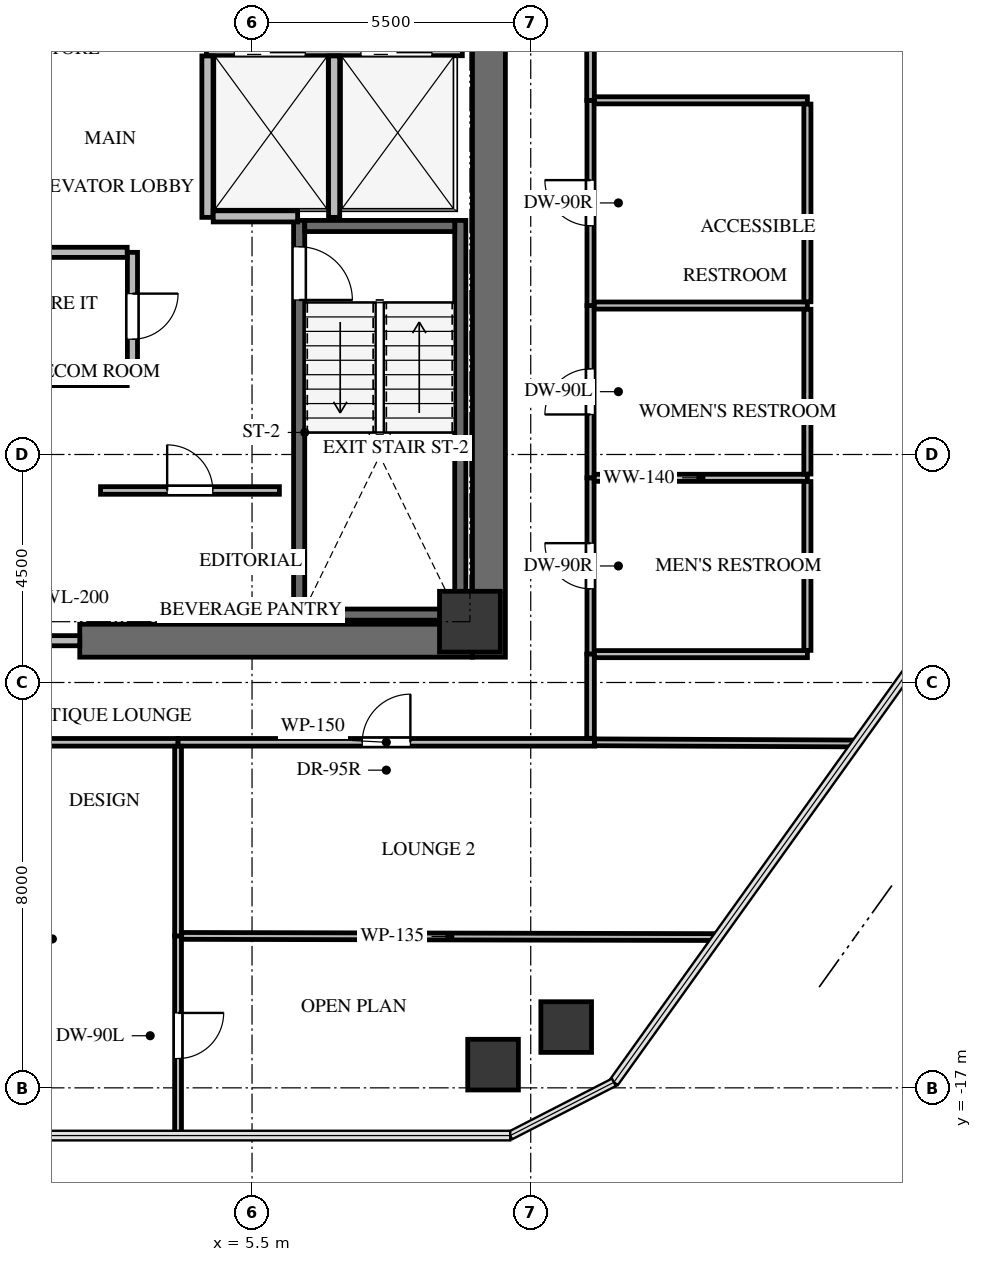
"""IFC4 building model, lengths in metres.
Left out: names, types, materials, properties, quantities, classifications, styles, units other than length and angle.
Written with IfcOpenShell. Run it as: python <this file> out.ifc"""

import sys

from ifc_helpers import new_model, si_unit, direction, frame, frame_2d, origin, origin_2d, place, context, subcontext, project, spatial, rectangle, extrude, source, transform, mapped, element, fill, save


model = new_model("IFC4")
c1 = context("Model", 3, precision=1e-05, world=origin(), true_north=direction((0.0, 1.0)))
c2 = subcontext(c1, "Body", "Model", "MODEL_VIEW")
j1 = project(units=[si_unit("LENGTHUNIT", "METRE"), si_unit("PLANEANGLEUNIT", "RADIAN")], contexts=[c1])
p1 = place(None, origin())
s1 = spatial("IfcSite", under=j1, at=p1, CompositionType="ELEMENT")
p2 = place(p1, origin())
s2 = spatial("IfcBuilding", under=s1, at=p2, CompositionType="ELEMENT")
p3 = place(p2, frame((0.0, 0.0, 187.0)))
s3 = spatial("IfcBuildingStorey", under=s2, at=p3, CompositionType="ELEMENT", Elevation=187.0)
p4 = place(p3, frame((10.175, -8.5, 0.0), z_axis=(0.0, 0.0, 1.0), x_axis=(0.0, 1.0, 0.0)))
e1 = element("IfcWall", 1, at=p4, inside=s3, PredefinedType="SHEAR", context=c2, shape_type="SweptSolid", body=[
    extrude(rectangle(XDim=17.0, YDim=0.65, at=frame_2d((8.5, 0.0))), origin(), (0.0, 0.0, 1.0), 3.3),
])
p5 = place(p3, frame((2.1, -8.175, 0.0), z_axis=(0.0, 0.0, 1.0), x_axis=(1.0, 0.0, 0.0)))
e2 = element("IfcWall", 2, at=p5, inside=s3, PredefinedType="SHEAR", context=c2, shape_type="SweptSolid", body=[
    extrude(rectangle(XDim=7.75, YDim=0.65, at=frame_2d((3.875, 0.0))), origin(), (0.0, 0.0, 1.0), 3.3),
])
p6 = place(p3, frame((9.61, -7.77, -0.24), z_axis=(0.0, 0.0, 1.0), x_axis=(0.0, 1.0, 0.0)))
e3 = element("IfcWall", 3, at=p6, inside=s3, PredefinedType="SHEAR", context=c2, shape_type="SweptSolid", body=[
    extrude(rectangle(XDim=7.89, YDim=0.22, at=frame_2d((3.945, 0.0))), origin(), (0.0, 0.0, 1.0), 3.3),
])
p7 = place(p3, frame((6.43, 0.12, -0.24), z_axis=(0.0, 0.0, 1.0), x_axis=(0.0, -1.0, 0.0)))
e4 = element("IfcWall", 4, at=p7, inside=s3, PredefinedType="SHEAR", context=c2, shape_type="SweptSolid", body=[
    extrude(rectangle(XDim=7.89, YDim=0.22, at=frame_2d((3.945, 0.0))), origin(), (0.0, 0.0, 1.0), 3.3),
])
p8 = place(p7, frame((0.52, 0.0, 0.0)))
e5 = element("IfcOpeningElement", 5, at=p8, cuts=e4, PredefinedType="OPENING", context=c2, shape_type="SweptSolid", body=[
    extrude(rectangle(XDim=1.05, YDim=2.15, at=frame_2d((0.525, 1.075))), frame((0.0, 0.12, 0.0), z_axis=(0.0, -1.0, 0.0), x_axis=(1.0, 0.0, 0.0)), (0.0, 0.0, 1.0), 0.24),
])
for number, where, z_axis, x_axis in (
    (6, (6.54, -7.66, -0.24), (0.0, 0.0, 1.0), (1.0, 0.0, 0.0)),
    (7, (9.5, 0.01, -0.24), (0.0, 0.0, 1.0), (-1.0, 0.0, 0.0)),
):
    element("IfcWall", number, at=place(p3, frame(where, z_axis=z_axis, x_axis=x_axis)), inside=s3, PredefinedType="SHEAR", context=c2, shape_type="SweptSolid", body=[
        extrude(rectangle(XDim=2.96, YDim=0.22, at=frame_2d((1.48, 0.0))), origin(), (0.0, 0.0, 1.0), 3.3),
    ])
m1 = source(origin(), c2, "Body", "SweptSolid", [
    extrude(rectangle(XDim=1.2, YDim=1.2, at=origin_2d()), origin(), (0.0, 0.0, 1.0), 3.3),
])
p9 = place(p3, frame((9.8, -7.8, -0.24), z_axis=(0.0, 0.0, 1.0), x_axis=(1.0, 0.0, 0.0)))
e8 = element("IfcColumn", 8, at=p9, inside=s3, PredefinedType="COLUMN", context=c2, shape_type="MappedRepresentation", body=[
    mapped(m1, transform((0.0, 0.0, 0.0), x_axis=(1.0, 0.0, 0.0), y_axis=(0.0, 1.0, 0.0), z_axis=(0.0, 0.0, 1.0), scale=1.0)),
])
m2 = source(origin(), c2, "Body", "SweptSolid", [
    extrude(rectangle(XDim=1.0, YDim=1.0, at=origin_2d()), origin(), (0.0, 0.0, 1.0), 3.3),
])
for number, where, z_axis, x_axis in (
    (9, (11.7, -15.8, -0.24), (0.0, 0.0, 1.0), (1.0, 0.0, 0.0)),
    (10, (10.257, -16.542, -0.24), (0.0, 0.0, 1.0), (1.0, 0.0, 0.0)),
):
    element("IfcColumn", number, at=place(p3, frame(where, z_axis=z_axis, x_axis=x_axis)), inside=s3, PredefinedType="COLUMN", context=c2, shape_type="MappedRepresentation", body=[
        mapped(m2, transform((0.0, 0.0, 0.0), x_axis=(1.0, 0.0, 0.0), y_axis=(0.0, 1.0, 0.0), z_axis=(0.0, 0.0, 1.0), scale=1.0)),
    ])
p10 = place(p3, frame((-2.1, -8.175, 0.0), z_axis=(0.0, 0.0, 1.0), x_axis=(1.0, 0.0, 0.0)))
e11 = element("IfcWall", 11, at=p10, inside=s3, PredefinedType="SOLIDWALL", context=c2, shape_type="SweptSolid", body=[
    extrude(rectangle(XDim=4.2, YDim=0.2, at=frame_2d((2.1, 0.0))), origin(), (0.0, 0.0, 1.0), 3.045),
])
p11 = place(p10, frame((1.2, 0.0, 0.0)))
e12 = element("IfcOpeningElement", 12, at=p11, cuts=e11, PredefinedType="OPENING", context=c2, shape_type="SweptSolid", body=[
    extrude(rectangle(XDim=1.8, YDim=2.15, at=frame_2d((0.9, 1.075))), frame((0.0, 0.11, 0.0), z_axis=(0.0, -1.0, 0.0), x_axis=(1.0, 0.0, 0.0)), (0.0, 0.0, 1.0), 0.22),
])
p12 = place(p3, frame((4.6, 3.48, 0.0), z_axis=(0.0, 0.0, 1.0), x_axis=(1.0, 0.0, 0.0)))
e13 = element("IfcWall", 13, at=p12, inside=s3, PredefinedType="SOLIDWALL", context=c2, shape_type="SweptSolid", body=[
    extrude(rectangle(XDim=5.05, YDim=0.22, at=frame_2d((2.525, 0.0))), origin(), (0.0, 0.0, 1.0), 3.045),
])
p13 = place(p12, frame((0.55, 0.0, 0.0)))
e14 = element("IfcOpeningElement", 14, at=p13, cuts=e13, PredefinedType="OPENING", context=c2, shape_type="SweptSolid", body=[
    extrude(rectangle(XDim=1.4, YDim=2.15, at=frame_2d((0.7, 1.075))), frame((0.0, 0.12, 0.0), z_axis=(0.0, -1.0, 0.0), x_axis=(1.0, 0.0, 0.0)), (0.0, 0.0, 1.0), 0.24),
])
p14 = place(p12, frame((3.05, 0.0, 0.0)))
e15 = element("IfcOpeningElement", 15, at=p14, cuts=e13, PredefinedType="OPENING", context=c2, shape_type="SweptSolid", body=[
    extrude(rectangle(XDim=1.4, YDim=2.15, at=frame_2d((0.7, 1.075))), frame((0.0, 0.12, 0.0), z_axis=(0.0, -1.0, 0.0), x_axis=(1.0, 0.0, 0.0)), (0.0, 0.0, 1.0), 0.24),
])
for number, where, z_axis, x_axis in (
    (16, (4.62, 0.18, 0.0), (0.0, 0.0, 1.0), (0.0, 1.0, 0.0)),
    (17, (7.12, 0.18, 0.0), (0.0, 0.0, 1.0), (0.0, 1.0, 0.0)),
):
    element("IfcWall", number, at=place(p3, frame(where, z_axis=z_axis, x_axis=x_axis)), inside=s3, PredefinedType="SOLIDWALL", context=c2, shape_type="SweptSolid", body=[
        extrude(rectangle(XDim=3.186, YDim=0.22, at=frame_2d((1.593, 0.0))), origin(), (0.0, 0.0, 1.0), 3.045),
    ])
p15 = place(p3, frame((4.734, 0.2, 0.0), z_axis=(0.0, 0.0, 1.0), x_axis=(1.0, 0.0, 0.0)))
e18 = element("IfcWall", 18, at=p15, inside=s3, PredefinedType="SOLIDWALL", context=c2, shape_type="SweptSolid", body=[
    extrude(rectangle(XDim=1.666, YDim=0.22, at=frame_2d((0.833, 0.0))), origin(), (0.0, 0.0, 1.0), 3.045),
])
p16 = place(p3, frame((2.51, -5.21, 0.0), z_axis=(0.0, 0.0, 1.0), x_axis=(1.0, 0.0, 0.0)))
e19 = element("IfcWall", 19, at=p16, inside=s3, PredefinedType="PARTITIONING", context=c2, shape_type="SweptSolid", body=[
    extrude(rectangle(XDim=3.53, YDim=0.15, at=frame_2d((1.765, 0.0))), origin(), (0.0, 0.0, 1.0), 3.045),
])
p17 = place(p16, frame((1.315, 0.0, 0.0)))
e20 = element("IfcOpeningElement", 20, at=p17, cuts=e19, PredefinedType="OPENING", context=c2, shape_type="SweptSolid", body=[
    extrude(rectangle(XDim=0.9, YDim=2.05, at=frame_2d((0.45, 1.025))), frame((0.0, 0.085, 0.0), z_axis=(0.0, -1.0, 0.0), x_axis=(1.0, 0.0, 0.0)), (0.0, 0.0, 1.0), 0.17),
])
p18 = place(p3, frame((3.14, -0.51, 0.0), z_axis=(0.0, 0.0, 1.0), x_axis=(0.0, -1.0, 0.0)))
e21 = element("IfcWall", 21, at=p18, inside=s3, PredefinedType="SOLIDWALL", context=c2, shape_type="SweptSolid", body=[
    extrude(rectangle(XDim=2.53, YDim=0.2, at=frame_2d((1.265, 0.0))), origin(), (0.0, 0.0, 1.0), 3.045),
])
p19 = place(p18, frame((0.815, 0.0, 0.0)))
e22 = element("IfcOpeningElement", 22, at=p19, cuts=e21, PredefinedType="OPENING", context=c2, shape_type="SweptSolid", body=[
    extrude(rectangle(XDim=0.9, YDim=2.05, at=frame_2d((0.45, 1.025))), frame((0.0, 0.11, 0.0), z_axis=(0.0, -1.0, 0.0), x_axis=(1.0, 0.0, 0.0)), (0.0, 0.0, 1.0), 0.22),
])
for number, where, z_axis, x_axis in (
    (23, (3.036, -3.04, 0.0), (0.0, 0.0, 1.0), (-1.0, 0.0, 0.0)),
    (24, (1.21, -0.51, 0.0), (0.0, 0.0, 1.0), (1.0, 0.0, 0.0)),
):
    element("IfcWall", number, at=place(p3, frame(where, z_axis=z_axis, x_axis=x_axis)), inside=s3, PredefinedType="SOLIDWALL", context=c2, shape_type="SweptSolid", body=[
        extrude(rectangle(XDim=1.826, YDim=0.2, at=frame_2d((0.913, 0.0))), origin(), (0.0, 0.0, 1.0), 3.045),
    ])
p20 = place(p3, frame((12.18, -8.44, 0.0), z_axis=(0.0, 0.0, 1.0), x_axis=(0.0, 1.0, 0.0)))
e25 = element("IfcWall", 25, at=p20, inside=s3, PredefinedType="PARTITIONING", context=c2, shape_type="SweptSolid", body=[
    extrude(rectangle(XDim=3.48, YDim=0.14, at=frame_2d((1.74, 0.0))), origin(), (0.0, 0.0, 1.0), 3.045),
])
p21 = place(p20, frame((1.29, 0.0, 0.0)))
e26 = element("IfcOpeningElement", 26, at=p21, cuts=e25, PredefinedType="OPENING", context=c2, shape_type="SweptSolid", body=[
    extrude(rectangle(XDim=0.9, YDim=2.05, at=frame_2d((0.45, 1.025))), frame((0.0, 0.08, 0.0), z_axis=(0.0, -1.0, 0.0), x_axis=(1.0, 0.0, 0.0)), (0.0, 0.0, 1.0), 0.16),
])
p22 = place(p3, frame((12.18, -4.96, 0.0), z_axis=(0.0, 0.0, 1.0), x_axis=(0.0, 1.0, 0.0)))
e27 = element("IfcWall", 27, at=p22, inside=s3, PredefinedType="PARTITIONING", context=c2, shape_type="SweptSolid", body=[
    extrude(rectangle(XDim=3.4, YDim=0.14, at=frame_2d((1.7, 0.0))), origin(), (0.0, 0.0, 1.0), 3.045),
])
p23 = place(p22, frame((1.25, 0.0, 0.0)))
e28 = element("IfcOpeningElement", 28, at=p23, cuts=e27, PredefinedType="OPENING", context=c2, shape_type="SweptSolid", body=[
    extrude(rectangle(XDim=0.9, YDim=2.05, at=frame_2d((0.45, 1.025))), frame((0.0, 0.08, 0.0), z_axis=(0.0, -1.0, 0.0), x_axis=(1.0, 0.0, 0.0)), (0.0, 0.0, 1.0), 0.16),
])
p24 = place(p3, frame((12.18, -1.56, 0.0), z_axis=(0.0, 0.0, 1.0), x_axis=(0.0, 1.0, 0.0)))
e29 = element("IfcWall", 29, at=p24, inside=s3, PredefinedType="PARTITIONING", context=c2, shape_type="SweptSolid", body=[
    extrude(rectangle(XDim=4.05, YDim=0.14, at=frame_2d((2.025, 0.0))), origin(), (0.0, 0.0, 1.0), 2.242),
])
p25 = place(p24, frame((1.575, 0.0, 0.0)))
e30 = element("IfcOpeningElement", 30, at=p25, cuts=e29, PredefinedType="OPENING", context=c2, shape_type="SweptSolid", body=[
    extrude(rectangle(XDim=0.9, YDim=2.05, at=frame_2d((0.45, 1.025))), frame((0.0, 0.08, 0.0), z_axis=(0.0, -1.0, 0.0), x_axis=(1.0, 0.0, 0.0)), (0.0, 0.0, 1.0), 0.16),
])
p26 = place(p3, frame((1.089, -10.18, 0.0), z_axis=(0.0, 0.0, 1.0), x_axis=(1.0, 0.0, 0.0)))
e31 = element("IfcWall", 31, at=p26, inside=s3, PredefinedType="PARTITIONING", context=c2, shape_type="SweptSolid", body=[
    extrude(rectangle(XDim=2.951, YDim=0.15, at=frame_2d((1.476, 0.0))), origin(), (0.0, 0.0, 1.0), 3.045),
])
p27 = place(p3, frame((4.04, -10.18, 0.0), z_axis=(0.0, 0.0, 1.0), x_axis=(1.0, 0.0, 0.0)))
e32 = element("IfcWall", 32, at=p27, inside=s3, PredefinedType="PARTITIONING", context=c2, shape_type="SweptSolid", body=[
    extrude(rectangle(XDim=8.22, YDim=0.15, at=frame_2d((4.11, 0.0))), origin(), (0.0, 0.0, 1.0), 2.242),
])
p28 = place(p27, frame((3.635, 0.0, 0.0)))
e33 = element("IfcOpeningElement", 33, at=p28, cuts=e32, PredefinedType="OPENING", context=c2, shape_type="SweptSolid", body=[
    extrude(rectangle(XDim=0.95, YDim=2.1, at=frame_2d((0.475, 1.05))), frame((0.0, 0.085, 0.0), z_axis=(0.0, -1.0, 0.0), x_axis=(1.0, 0.0, 0.0)), (0.0, 0.0, 1.0), 0.17),
])
p29 = place(p3, frame((12.18, 2.49, 0.0), z_axis=(0.0, 0.0, 1.0), x_axis=(0.0, 1.0, 0.0)))
e34 = element("IfcWall", 34, at=p29, inside=s3, PredefinedType="PARTITIONING", context=c2, shape_type="SweptSolid", body=[
    extrude(rectangle(XDim=7.611, YDim=0.15, at=frame_2d((3.806, 0.0))), origin(), (0.0, 0.0, 1.0), 3.045),
])
p30 = place(p29, frame((3.345, 0.0, 0.0)))
e35 = element("IfcOpeningElement", 35, at=p30, cuts=e34, PredefinedType="OPENING", context=c2, shape_type="SweptSolid", body=[
    extrude(rectangle(XDim=0.92, YDim=2.1, at=frame_2d((0.46, 1.05))), frame((0.0, 0.085, 0.0), z_axis=(0.0, -1.0, 0.0), x_axis=(1.0, 0.0, 0.0)), (0.0, 0.0, 1.0), 0.17),
])
p31 = place(p3, frame((12.18, -10.101, 0.0), z_axis=(0.0, 0.0, 1.0), x_axis=(0.0, 1.0, 0.0)))
e36 = element("IfcWall", 36, at=p31, inside=s3, PredefinedType="PARTITIONING", context=c2, shape_type="SweptSolid", body=[
    extrude(rectangle(XDim=1.661, YDim=0.15, at=frame_2d((0.831, 0.0))), origin(), (0.0, 0.0, 1.0), 3.045),
])
p32 = place(p3, frame((12.254, -4.96, 0.0), z_axis=(0.0, 0.0, 1.0), x_axis=(1.0, 0.0, 0.0)))
e37 = element("IfcWall", 37, at=p32, inside=s3, PredefinedType="PARTITIONING", context=c2, shape_type="SweptSolid", body=[
    extrude(rectangle(XDim=4.206, YDim=0.14, at=frame_2d((2.103, 0.0))), origin(), (0.0, 0.0, 1.0), 3.045),
])
p33 = place(p3, frame((16.46, -8.44, 0.0), z_axis=(0.0, 0.0, 1.0), x_axis=(-1.0, 0.0, 0.0)))
e38 = element("IfcWall", 38, at=p33, inside=s3, PredefinedType="PARTITIONING", context=c2, shape_type="SweptSolid", body=[
    extrude(rectangle(XDim=4.201, YDim=0.14, at=frame_2d((2.101, 0.0))), origin(), (0.0, 0.0, 1.0), 3.045),
])
p34 = place(p3, frame((16.46, -5.034, 0.0), z_axis=(0.0, 0.0, 1.0), x_axis=(0.0, -1.0, 0.0)))
e39 = element("IfcWall", 39, at=p34, inside=s3, PredefinedType="PARTITIONING", context=c2, shape_type="SweptSolid", body=[
    extrude(rectangle(XDim=3.332, YDim=0.14, at=frame_2d((1.666, 0.0))), origin(), (0.0, 0.0, 1.0), 3.045),
])
p35 = place(p3, frame((12.254, -1.56, 0.0), z_axis=(0.0, 0.0, 1.0), x_axis=(1.0, 0.0, 0.0)))
e40 = element("IfcWall", 40, at=p35, inside=s3, PredefinedType="PARTITIONING", context=c2, shape_type="SweptSolid", body=[
    extrude(rectangle(XDim=4.206, YDim=0.14, at=frame_2d((2.103, 0.0))), origin(), (0.0, 0.0, 1.0), 3.045),
])
p36 = place(p3, frame((16.46, -1.634, 0.0), z_axis=(0.0, 0.0, 1.0), x_axis=(0.0, -1.0, 0.0)))
e41 = element("IfcWall", 41, at=p36, inside=s3, PredefinedType="PARTITIONING", context=c2, shape_type="SweptSolid", body=[
    extrude(rectangle(XDim=3.252, YDim=0.14, at=frame_2d((1.626, 0.0))), origin(), (0.0, 0.0, 1.0), 3.045),
])
p37 = place(p3, frame((12.259, 2.49, 0.0), z_axis=(0.0, 0.0, 1.0), x_axis=(1.0, 0.0, 0.0)))
e42 = element("IfcWall", 42, at=p37, inside=s3, PredefinedType="PARTITIONING", context=c2, shape_type="SweptSolid", body=[
    extrude(rectangle(XDim=4.201, YDim=0.14, at=frame_2d((2.101, 0.0))), origin(), (0.0, 0.0, 1.0), 3.045),
])
p38 = place(p3, frame((16.46, 2.416, 0.0), z_axis=(0.0, 0.0, 1.0), x_axis=(0.0, -1.0, 0.0)))
e43 = element("IfcWall", 43, at=p38, inside=s3, PredefinedType="PARTITIONING", context=c2, shape_type="SweptSolid", body=[
    extrude(rectangle(XDim=3.902, YDim=0.14, at=frame_2d((1.951, 0.0))), origin(), (0.0, 0.0, 1.0), 2.242),
])
p39 = place(p3, frame((4.04, -14.001, 0.0), z_axis=(0.0, 0.0, 1.0), x_axis=(0.0, -1.0, 0.0)))
e44 = element("IfcWall", 44, at=p39, inside=s3, PredefinedType="PARTITIONING", context=c2, shape_type="SweptSolid", body=[
    extrude(rectangle(XDim=3.941, YDim=0.135, at=frame_2d((1.97, 0.0))), origin(), (0.0, 0.0, 1.0), 2.399),
])
p40 = place(p39, frame((1.521, 0.0, 0.0)))
e45 = element("IfcOpeningElement", 45, at=p40, cuts=e44, PredefinedType="OPENING", context=c2, shape_type="SweptSolid", body=[
    extrude(rectangle(XDim=0.9, YDim=2.05, at=frame_2d((0.45, 1.025))), frame((0.0, 0.078, 0.0), z_axis=(0.0, -1.0, 0.0), x_axis=(1.0, 0.0, 0.0)), (0.0, 0.0, 1.0), 0.155),
])
p41 = place(p3, frame((4.04, -10.259, 0.0), z_axis=(0.0, 0.0, 1.0), x_axis=(0.0, -1.0, 0.0)))
e46 = element("IfcWall", 46, at=p41, inside=s3, PredefinedType="PARTITIONING", context=c2, shape_type="SweptSolid", body=[
    extrude(rectangle(XDim=3.742, YDim=0.135, at=frame_2d((1.871, 0.0))), origin(), (0.0, 0.0, 1.0), 3.045),
])
p42 = place(p3, frame((4.112, -14.001, 0.0), z_axis=(0.0, 0.0, 1.0), x_axis=(0.999997597863, -0.002191864053, 0.0)))
e47 = element("IfcWall", 47, at=p42, inside=s3, PredefinedType="PARTITIONING", context=c2, shape_type="SweptSolid", body=[
    extrude(rectangle(XDim=10.582, YDim=0.135, at=frame_2d((5.291, 0.0))), origin(), (0.0, 0.0, 1.0), 2.242),
])
p43 = place(p3, frame((12.26, -10.18, 0.0), z_axis=(0.0, 0.0, 1.0), x_axis=(0.999990144117, -0.004439782427, 0.0)))
e48 = element("IfcWall", 48, at=p43, inside=s3, PredefinedType="PARTITIONING", context=c2, shape_type="SweptSolid", body=[
    extrude(rectangle(XDim=5.169, YDim=0.135, at=frame_2d((2.584, 0.0))), origin(), (0.0, 0.0, 1.0), 2.399),
])
m3 = source(origin(), c2, "Body", "SweptSolid", [
    extrude(rectangle(XDim=1.05, YDim=2.15, at=frame_2d((0.525, 1.075))), frame((0.0, 0.025, 0.0), z_axis=(0.0, -1.0, 0.0), x_axis=(1.0, 0.0, 0.0)), (0.0, 0.0, 1.0), 0.05),
])
p44 = place(p8, origin())
e49 = element("IfcDoor", 49, at=p44, inside=s3, OperationType="SINGLE_SWING_RIGHT", PredefinedType="DOOR", context=c2, shape_type="MappedRepresentation", body=[
    mapped(m3, transform((0.0, 0.0, 0.0), x_axis=(1.0, 0.0, 0.0), y_axis=(0.0, 1.0, 0.0), z_axis=(0.0, 0.0, 1.0), scale=1.0)),
])
fill(e5, e49)
m4 = source(origin(), c2, "Body", "SweptSolid", [
    extrude(rectangle(XDim=0.9, YDim=2.05, at=frame_2d((0.45, 1.025))), frame((0.0, 0.025, 0.0), z_axis=(0.0, -1.0, 0.0), x_axis=(1.0, 0.0, 0.0)), (0.0, 0.0, 1.0), 0.05),
])
p45 = place(p17, origin())
e50 = element("IfcDoor", 50, at=p45, inside=s3, OperationType="SINGLE_SWING_LEFT", PredefinedType="DOOR", context=c2, shape_type="MappedRepresentation", body=[
    mapped(m4, transform((0.0, 0.0, 0.0), x_axis=(1.0, 0.0, 0.0), y_axis=(0.0, 1.0, 0.0), z_axis=(0.0, 0.0, 1.0), scale=1.0)),
])
fill(e20, e50)
p46 = place(p19, origin())
e51 = element("IfcDoor", 51, at=p46, inside=s3, OperationType="SINGLE_SWING_LEFT", PredefinedType="DOOR", context=c2, shape_type="MappedRepresentation", body=[
    mapped(m4, transform((0.0, 0.0, 0.0), x_axis=(1.0, 0.0, 0.0), y_axis=(0.0, 1.0, 0.0), z_axis=(0.0, 0.0, 1.0), scale=1.0)),
])
fill(e22, e51)
m5 = source(origin(), c2, "Body", "SweptSolid", [
    extrude(rectangle(XDim=0.9, YDim=2.05, at=frame_2d((0.45, 1.025))), frame((0.0, 0.025, 0.0), z_axis=(0.0, -1.0, 0.0), x_axis=(1.0, 0.0, 0.0)), (0.0, 0.0, 1.0), 0.05),
])
p47 = place(p21, origin())
e52 = element("IfcDoor", 52, at=p47, inside=s3, OperationType="SINGLE_SWING_RIGHT", PredefinedType="DOOR", context=c2, shape_type="MappedRepresentation", body=[
    mapped(m5, transform((0.0, 0.0, 0.0), x_axis=(1.0, 0.0, 0.0), y_axis=(0.0, 1.0, 0.0), z_axis=(0.0, 0.0, 1.0), scale=1.0)),
])
fill(e26, e52)
m6 = source(origin(), c2, "Body", "SweptSolid", [
    extrude(rectangle(XDim=0.9, YDim=2.05, at=frame_2d((0.45, 1.025))), frame((0.0, 0.025, 0.0), z_axis=(0.0, -1.0, 0.0), x_axis=(1.0, 0.0, 0.0)), (0.0, 0.0, 1.0), 0.05),
])
p48 = place(p23, origin())
e53 = element("IfcDoor", 53, at=p48, inside=s3, OperationType="SINGLE_SWING_LEFT", PredefinedType="DOOR", context=c2, shape_type="MappedRepresentation", body=[
    mapped(m6, transform((0.0, 0.0, 0.0), x_axis=(1.0, 0.0, 0.0), y_axis=(0.0, 1.0, 0.0), z_axis=(0.0, 0.0, 1.0), scale=1.0)),
])
fill(e28, e53)
p49 = place(p25, origin())
e54 = element("IfcDoor", 54, at=p49, inside=s3, OperationType="SINGLE_SWING_RIGHT", PredefinedType="DOOR", context=c2, shape_type="MappedRepresentation", body=[
    mapped(m5, transform((0.0, 0.0, 0.0), x_axis=(1.0, 0.0, 0.0), y_axis=(0.0, 1.0, 0.0), z_axis=(0.0, 0.0, 1.0), scale=1.0)),
])
fill(e30, e54)
m7 = source(origin(), c2, "Body", "SweptSolid", [
    extrude(rectangle(XDim=0.95, YDim=2.1, at=frame_2d((0.475, 1.05))), frame((0.0, 0.025, 0.0), z_axis=(0.0, -1.0, 0.0), x_axis=(1.0, 0.0, 0.0)), (0.0, 0.0, 1.0), 0.05),
])
p50 = place(p28, origin())
e55 = element("IfcDoor", 55, at=p50, inside=s3, OperationType="SINGLE_SWING_RIGHT", PredefinedType="DOOR", context=c2, shape_type="MappedRepresentation", body=[
    mapped(m7, transform((0.0, 0.0, 0.0), x_axis=(1.0, 0.0, 0.0), y_axis=(0.0, 1.0, 0.0), z_axis=(0.0, 0.0, 1.0), scale=1.0)),
])
fill(e33, e55)
p51 = place(p40, origin())
e56 = element("IfcDoor", 56, at=p51, inside=s3, OperationType="SINGLE_SWING_LEFT", PredefinedType="DOOR", context=c2, shape_type="MappedRepresentation", body=[
    mapped(m6, transform((0.0, 0.0, 0.0), x_axis=(1.0, 0.0, 0.0), y_axis=(0.0, 1.0, 0.0), z_axis=(0.0, 0.0, 1.0), scale=1.0)),
])
fill(e45, e56)
save(model, sys.argv[1])
